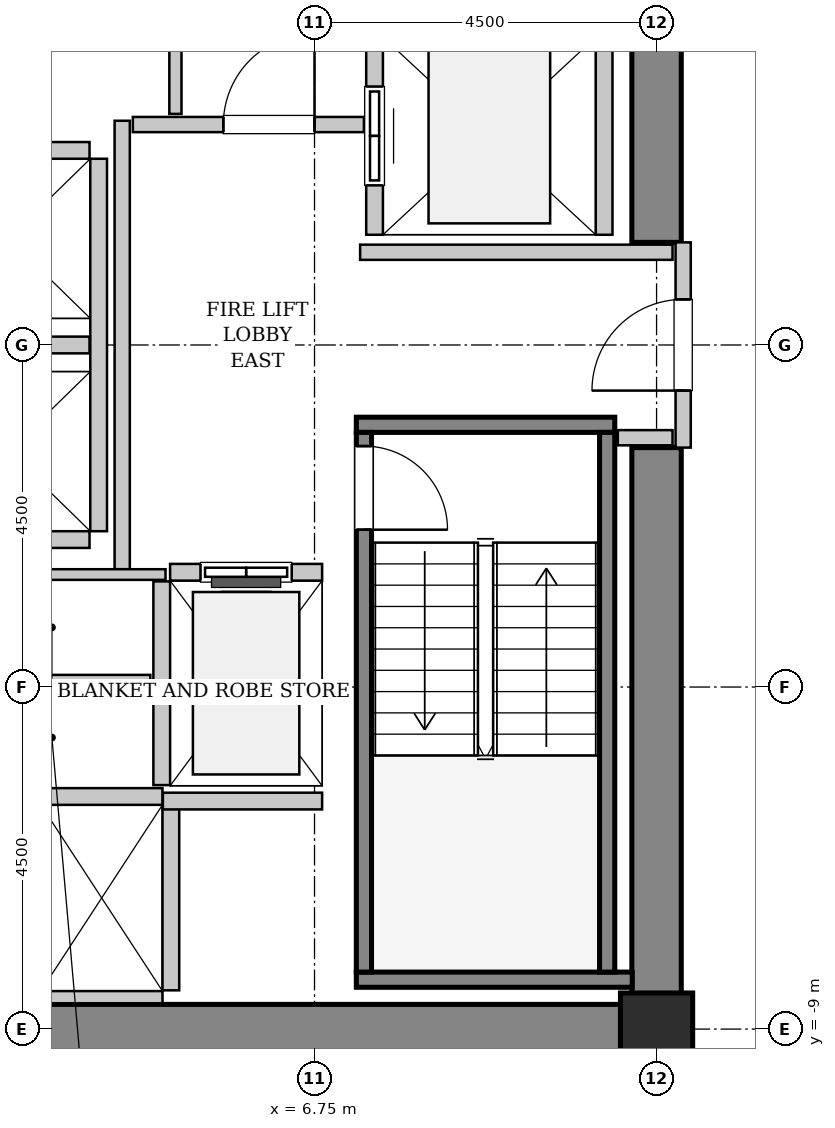
"""IFC4 building model, lengths in metres.
Left out: names, types, materials, properties, quantities, classifications, styles, units other than length and angle.
Written with IfcOpenShell. Run it as: python <this file> out.ifc"""

import sys

from ifc_helpers import new_model, si_unit, direction, frame, frame_2d, origin, origin_2d, place, context, subcontext, project, spatial, rectangle, hollow_rectangle, extrude, source, transform, mapped, element, fill, save


model = new_model("IFC4")
c1 = context("Model", 3, precision=1e-05, world=origin(), true_north=direction((0.0, 1.0)))
c2 = subcontext(c1, "Body", "Model", "MODEL_VIEW")
j1 = project(units=[si_unit("LENGTHUNIT", "METRE"), si_unit("PLANEANGLEUNIT", "RADIAN")], contexts=[c1])
p1 = place(None, origin())
s1 = spatial("IfcSite", under=j1, at=p1, CompositionType="ELEMENT")
p2 = place(p1, origin())
s2 = spatial("IfcBuilding", under=s1, at=p2, CompositionType="ELEMENT")
p3 = place(p2, frame((0.0, 0.0, 44.4)))
s3 = spatial("IfcBuildingStorey", under=s2, at=p3, CompositionType="ELEMENT", Elevation=44.4)
m1 = source(origin(), c2, "Body", "SweptSolid", [
    extrude(rectangle(XDim=10.025, YDim=0.65, at=frame_2d((5.012, 0.0))), origin(), (0.0, 0.0, 1.0), 3.8),
])
p4 = place(p3, frame((1.55, -9.0, 0.0), z_axis=(0.0, 0.0, 1.0), x_axis=(1.0, 0.0, 0.0)))
e1 = element("IfcWall", 1, at=p4, inside=s3, PredefinedType="SHEAR", context=c2, shape_type="MappedRepresentation", body=[
    mapped(m1, transform((0.0, 0.0, 0.0), x_axis=(1.0, 0.0, 0.0), y_axis=(0.0, 1.0, 0.0), z_axis=(0.0, 0.0, 1.0), scale=1.0)),
])
m2 = source(origin(), c2, "Body", "SweptSolid", [
    extrude(rectangle(XDim=7.325, YDim=0.65, at=frame_2d((3.663, 0.0))), origin(), (0.0, 0.0, 1.0), 3.8),
])
for number, where, z_axis, x_axis in (
    (2, (11.25, -8.675, 0.0), (0.0, 0.0, 1.0), (0.0, 1.0, 0.0)),
    (3, (11.25, 1.35, 0.0), (0.0, 0.0, 1.0), (0.0, 1.0, 0.0)),
):
    element("IfcWall", number, at=place(p3, frame(where, z_axis=z_axis, x_axis=x_axis)), inside=s3, PredefinedType="SHEAR", context=c2, shape_type="MappedRepresentation", body=[
        mapped(m2, transform((0.0, 0.0, 0.0), x_axis=(1.0, 0.0, 0.0), y_axis=(0.0, 1.0, 0.0), z_axis=(0.0, 0.0, 1.0), scale=1.0)),
    ])
m3 = source(origin(), c2, "Body", "SweptSolid", [
    extrude(hollow_rectangle(XDim=0.95, YDim=0.95, WallThickness=0.045, InnerFilletRadius=0.045, OuterFilletRadius=0.09, at=origin_2d()), origin(), (0.0, 0.0, 1.0), 3.8),
])
p5 = place(p3, frame((11.25, -9.0, 0.0), z_axis=(0.0, 0.0, 1.0), x_axis=(1.0, 0.0, 0.0)))
e4 = element("IfcColumn", 4, at=p5, inside=s3, PredefinedType="COLUMN", context=c2, shape_type="MappedRepresentation", body=[
    mapped(m3, transform((0.0, 0.0, 0.0), x_axis=(1.0, 0.0, 0.0), y_axis=(0.0, 1.0, 0.0), z_axis=(0.0, 0.0, 1.0), scale=1.0)),
])
m4 = source(origin(), c2, "Body", "SweptSolid", [
    extrude(rectangle(XDim=3.4, YDim=0.2, at=frame_2d((1.7, 0.0))), origin(), (0.0, 0.0, 1.0), 3.8),
])
p6 = place(p3, frame((7.3, -1.05, 0.0), z_axis=(0.0, 0.0, 1.0), x_axis=(1.0, 0.0, 0.0)))
e5 = element("IfcWall", 5, at=p6, inside=s3, PredefinedType="SOLIDWALL", context=c2, shape_type="MappedRepresentation", body=[
    mapped(m4, transform((0.0, 0.0, 0.0), x_axis=(1.0, 0.0, 0.0), y_axis=(0.0, 1.0, 0.0), z_axis=(0.0, 0.0, 1.0), scale=1.0)),
])
m5 = source(origin(), c2, "Body", "SweptSolid", [
    extrude(rectangle(XDim=3.63, YDim=0.2, at=frame_2d((1.815, 0.0))), origin(), (0.0, 0.0, 1.0), 3.8),
])
p7 = place(p3, frame((7.3, -8.35, 0.0), z_axis=(0.0, 0.0, 1.0), x_axis=(1.0, 0.0, 0.0)))
e6 = element("IfcWall", 6, at=p7, inside=s3, PredefinedType="SOLIDWALL", context=c2, shape_type="MappedRepresentation", body=[
    mapped(m5, transform((0.0, 0.0, 0.0), x_axis=(1.0, 0.0, 0.0), y_axis=(0.0, 1.0, 0.0), z_axis=(0.0, 0.0, 1.0), scale=1.0)),
])
m6 = source(origin(), c2, "Body", "SweptSolid", [
    extrude(rectangle(XDim=7.1, YDim=0.2, at=frame_2d((3.55, 0.0))), origin(), (0.0, 0.0, 1.0), 3.8),
])
p8 = place(p3, frame((7.4, -1.15, 0.0), z_axis=(0.0, 0.0, 1.0), x_axis=(0.0, -1.0, 0.0)))
e7 = element("IfcWall", 7, at=p8, inside=s3, PredefinedType="SOLIDWALL", context=c2, shape_type="MappedRepresentation", body=[
    mapped(m6, transform((0.0, 0.0, 0.0), x_axis=(1.0, 0.0, 0.0), y_axis=(0.0, 1.0, 0.0), z_axis=(0.0, 0.0, 1.0), scale=1.0)),
])
p9 = place(p8, frame((0.18, 0.0, 0.0)))
e8 = element("IfcOpeningElement", 8, at=p9, cuts=e7, PredefinedType="OPENING", context=c2, shape_type="SweptSolid", body=[
    extrude(rectangle(XDim=1.1, YDim=2.15, at=frame_2d((0.55, 1.075))), frame((0.0, 0.11, 0.0), z_axis=(0.0, -1.0, 0.0), x_axis=(1.0, 0.0, 0.0)), (0.0, 0.0, 1.0), 0.22),
])
p10 = place(p3, frame((10.6, -1.15, 0.0), z_axis=(0.0, 0.0, 1.0), x_axis=(0.0, -1.0, 0.0)))
e9 = element("IfcWall", 9, at=p10, inside=s3, PredefinedType="SOLIDWALL", context=c2, shape_type="MappedRepresentation", body=[
    mapped(m6, transform((0.0, 0.0, 0.0), x_axis=(1.0, 0.0, 0.0), y_axis=(0.0, 1.0, 0.0), z_axis=(0.0, 0.0, 1.0), scale=1.0)),
])
m7 = source(origin(), c2, "Body", "SweptSolid", [
    extrude(rectangle(XDim=2.0, YDim=0.22, at=frame_2d((1.0, 0.0))), origin(), (0.0, 0.0, 1.0), 3.535),
])
p11 = place(p3, frame((6.85, -2.99, 0.0), z_axis=(0.0, 0.0, 1.0), x_axis=(-1.0, 0.0, 0.0)))
e10 = element("IfcWall", 10, at=p11, inside=s3, PredefinedType="SOLIDWALL", context=c2, shape_type="MappedRepresentation", body=[
    mapped(m7, transform((0.0, 0.0, 0.0), x_axis=(1.0, 0.0, 0.0), y_axis=(0.0, 1.0, 0.0), z_axis=(0.0, 0.0, 1.0), scale=1.0)),
])
p12 = place(p11, frame((0.4, 0.0, 0.0)))
e11 = element("IfcOpeningElement", 11, at=p12, cuts=e10, PredefinedType="OPENING", context=c2, shape_type="SweptSolid", body=[
    extrude(rectangle(XDim=1.2, YDim=2.2, at=frame_2d((0.6, 1.1))), frame((0.0, 0.12, 0.0), z_axis=(0.0, -1.0, 0.0), x_axis=(1.0, 0.0, 0.0)), (0.0, 0.0, 1.0), 0.24),
])
m8 = source(origin(), c2, "Body", "SweptSolid", [
    extrude(rectangle(XDim=2.68, YDim=0.22, at=frame_2d((1.34, 0.0))), origin(), (0.0, 0.0, 1.0), 3.535),
])
p13 = place(p3, frame((4.74, -3.11, 0.0), z_axis=(0.0, 0.0, 1.0), x_axis=(0.0, -1.0, 0.0)))
e12 = element("IfcWall", 12, at=p13, inside=s3, PredefinedType="SOLIDWALL", context=c2, shape_type="MappedRepresentation", body=[
    mapped(m8, transform((0.0, 0.0, 0.0), x_axis=(1.0, 0.0, 0.0), y_axis=(0.0, 1.0, 0.0), z_axis=(0.0, 0.0, 1.0), scale=1.0)),
])
m9 = source(origin(), c2, "Body", "SweptSolid", [
    extrude(rectangle(XDim=5.45, YDim=0.22, at=frame_2d((2.725, 0.0))), origin(), (0.0, 0.0, 1.0), 3.535),
])
p14 = place(p3, frame((7.54, 6.9, 0.0), z_axis=(0.0, 0.0, 1.0), x_axis=(0.0, -1.0, 0.0)))
e13 = element("IfcWall", 13, at=p14, inside=s3, PredefinedType="SOLIDWALL", context=c2, shape_type="MappedRepresentation", body=[
    mapped(m9, transform((0.0, 0.0, 0.0), x_axis=(1.0, 0.0, 0.0), y_axis=(0.0, 1.0, 0.0), z_axis=(0.0, 0.0, 1.0), scale=1.0)),
])
p15 = place(p14, frame((3.5, 0.0, 0.0)))
e14 = element("IfcOpeningElement", 14, at=p15, cuts=e13, PredefinedType="OPENING", context=c2, shape_type="SweptSolid", body=[
    extrude(rectangle(XDim=1.3, YDim=2.3, at=frame_2d((0.65, 1.15))), frame((0.0, 0.12, 0.0), z_axis=(0.0, -1.0, 0.0), x_axis=(1.0, 0.0, 0.0)), (0.0, 0.0, 1.0), 0.24),
])
p16 = place(p14, frame((0.65, 0.0, 0.0)))
e15 = element("IfcOpeningElement", 15, at=p16, cuts=e13, PredefinedType="OPENING", context=c2, shape_type="SweptSolid", body=[
    extrude(rectangle(XDim=1.3, YDim=2.3, at=frame_2d((0.65, 1.15))), frame((0.0, 0.12, 0.0), z_axis=(0.0, -1.0, 0.0), x_axis=(1.0, 0.0, 0.0)), (0.0, 0.0, 1.0), 0.24),
])
p17 = place(p3, frame((10.56, 1.45, 0.0), z_axis=(0.0, 0.0, 1.0), x_axis=(0.0, 1.0, 0.0)))
e16 = element("IfcWall", 16, at=p17, inside=s3, PredefinedType="SOLIDWALL", context=c2, shape_type="MappedRepresentation", body=[
    mapped(m9, transform((0.0, 0.0, 0.0), x_axis=(1.0, 0.0, 0.0), y_axis=(0.0, 1.0, 0.0), z_axis=(0.0, 0.0, 1.0), scale=1.0)),
])
m10 = source(origin(), c2, "Body", "SweptSolid", [
    extrude(rectangle(XDim=3.2, YDim=0.22, at=frame_2d((1.6, 0.0))), origin(), (0.0, 0.0, 1.0), 3.535),
])
p18 = place(p3, frame((4.75, -5.94, 0.0), z_axis=(0.0, 0.0, 1.0), x_axis=(-1.0, 0.0, 0.0)))
e17 = element("IfcWall", 17, at=p18, inside=s3, PredefinedType="SOLIDWALL", context=c2, shape_type="MappedRepresentation", body=[
    mapped(m10, transform((0.0, 0.0, 0.0), x_axis=(1.0, 0.0, 0.0), y_axis=(0.0, 1.0, 0.0), z_axis=(0.0, 0.0, 1.0), scale=1.0)),
])
m11 = source(origin(), c2, "Body", "SweptSolid", [
    extrude(rectangle(XDim=3.2, YDim=0.16, at=frame_2d((1.6, 0.0))), origin(), (0.0, 0.0, 1.0), 2.425),
])
p19 = place(p3, frame((1.55, -8.58, 0.0), z_axis=(0.0, 0.0, 1.0), x_axis=(1.0, 0.0, 0.0)))
e18 = element("IfcWall", 18, at=p19, inside=s3, PredefinedType="PARTITIONING", context=c2, shape_type="MappedRepresentation", body=[
    mapped(m11, transform((0.0, 0.0, 0.0), x_axis=(1.0, 0.0, 0.0), y_axis=(0.0, 1.0, 0.0), z_axis=(0.0, 0.0, 1.0), scale=1.0)),
])
m12 = source(origin(), c2, "Body", "SweptSolid", [
    extrude(rectangle(XDim=2.43, YDim=0.22, at=frame_2d((1.215, 0.0))), origin(), (0.0, 0.0, 1.0), 3.535),
])
p20 = place(p3, frame((4.86, -8.49, 0.0), z_axis=(0.0, 0.0, 1.0), x_axis=(0.0, 1.0, 0.0)))
e19 = element("IfcWall", 19, at=p20, inside=s3, PredefinedType="SOLIDWALL", context=c2, shape_type="MappedRepresentation", body=[
    mapped(m12, transform((0.0, 0.0, 0.0), x_axis=(1.0, 0.0, 0.0), y_axis=(0.0, 1.0, 0.0), z_axis=(0.0, 0.0, 1.0), scale=1.0)),
])
m13 = source(origin(), c2, "Body", "SweptSolid", [
    extrude(rectangle(XDim=4.9, YDim=0.22, at=frame_2d((2.45, 0.0))), origin(), (0.0, 0.0, 1.0), 3.535),
])
p21 = place(p3, frame((3.91, -2.45, 0.0), z_axis=(0.0, 0.0, 1.0), x_axis=(0.0, 1.0, 0.0)))
e20 = element("IfcWall", 20, at=p21, inside=s3, PredefinedType="SOLIDWALL", context=c2, shape_type="MappedRepresentation", body=[
    mapped(m13, transform((0.0, 0.0, 0.0), x_axis=(1.0, 0.0, 0.0), y_axis=(0.0, 1.0, 0.0), z_axis=(0.0, 0.0, 1.0), scale=1.0)),
])
m14 = source(origin(), c2, "Body", "SweptSolid", [
    extrude(rectangle(XDim=2.13, YDim=0.22, at=frame_2d((1.065, 0.0))), origin(), (0.0, 0.0, 1.0), 3.535),
])
for number, where, z_axis, x_axis in (
    (21, (1.66, -2.56, 0.0), (0.0, 0.0, 1.0), (1.0, 0.0, 0.0)),
    (22, (1.66, 0.0, 0.0), (0.0, 0.0, 1.0), (1.0, 0.0, 0.0)),
    (23, (3.79, 2.56, 0.0), (0.0, 0.0, 1.0), (-1.0, 0.0, 0.0)),
):
    element("IfcWall", number, at=place(p3, frame(where, z_axis=z_axis, x_axis=x_axis)), inside=s3, PredefinedType="SOLIDWALL", context=c2, shape_type="MappedRepresentation", body=[
        mapped(m14, transform((0.0, 0.0, 0.0), x_axis=(1.0, 0.0, 0.0), y_axis=(0.0, 1.0, 0.0), z_axis=(0.0, 0.0, 1.0), scale=1.0)),
    ])
m15 = source(origin(), c2, "Body", "SweptSolid", [
    extrude(rectangle(XDim=2.095, YDim=0.22, at=frame_2d((1.048, 0.0))), origin(), (0.0, 0.0, 1.0), 3.535),
])
p22 = place(p3, frame((4.755, -6.0, 0.0), z_axis=(0.0, 0.0, 1.0), x_axis=(1.0, 0.0, 0.0)))
e24 = element("IfcWall", 24, at=p22, inside=s3, PredefinedType="SOLIDWALL", context=c2, shape_type="MappedRepresentation", body=[
    mapped(m15, transform((0.0, 0.0, 0.0), x_axis=(1.0, 0.0, 0.0), y_axis=(0.0, 1.0, 0.0), z_axis=(0.0, 0.0, 1.0), scale=1.0)),
])
m16 = source(origin(), c2, "Body", "SweptSolid", [
    extrude(rectangle(XDim=2.7, YDim=0.2, at=frame_2d((1.35, 0.0))), origin(), (0.0, 0.0, 1.0), 2.425),
])
p23 = place(p3, frame((11.6, -1.35, 0.0), z_axis=(0.0, 0.0, 1.0), x_axis=(0.0, 1.0, 0.0)))
e25 = element("IfcWall", 25, at=p23, inside=s3, PredefinedType="PARTITIONING", context=c2, shape_type="MappedRepresentation", body=[
    mapped(m16, transform((0.0, 0.0, 0.0), x_axis=(1.0, 0.0, 0.0), y_axis=(0.0, 1.0, 0.0), z_axis=(0.0, 0.0, 1.0), scale=1.0)),
])
p24 = place(p23, frame((0.75, 0.0, 0.0)))
e26 = element("IfcOpeningElement", 26, at=p24, cuts=e25, PredefinedType="OPENING", context=c2, shape_type="SweptSolid", body=[
    extrude(rectangle(XDim=1.2, YDim=2.15, at=frame_2d((0.6, 1.075))), frame((0.0, 0.11, 0.0), z_axis=(0.0, -1.0, 0.0), x_axis=(1.0, 0.0, 0.0)), (0.0, 0.0, 1.0), 0.22),
])
m17 = source(origin(), c2, "Body", "SweptSolid", [
    extrude(rectangle(XDim=5.9, YDim=0.2, at=frame_2d((2.95, 0.0))), origin(), (0.0, 0.0, 1.0), 3.535),
])
p25 = place(p3, frame((4.22, -2.95, 0.0), z_axis=(0.0, 0.0, 1.0), x_axis=(0.0, 1.0, 0.0)))
e27 = element("IfcWall", 27, at=p25, inside=s3, PredefinedType="PARTITIONING", context=c2, shape_type="MappedRepresentation", body=[
    mapped(m17, transform((0.0, 0.0, 0.0), x_axis=(1.0, 0.0, 0.0), y_axis=(0.0, 1.0, 0.0), z_axis=(0.0, 0.0, 1.0), scale=1.0)),
])
m18 = source(origin(), c2, "Body", "SweptSolid", [
    extrude(rectangle(XDim=3.04, YDim=0.2, at=frame_2d((1.52, 0.0))), origin(), (0.0, 0.0, 1.0), 3.535),
])
p26 = place(p3, frame((4.36, 2.9, 0.0), z_axis=(0.0, 0.0, 1.0), x_axis=(1.0, 0.0, 0.0)))
e28 = element("IfcWall", 28, at=p26, inside=s3, PredefinedType="PARTITIONING", context=c2, shape_type="MappedRepresentation", body=[
    mapped(m18, transform((0.0, 0.0, 0.0), x_axis=(1.0, 0.0, 0.0), y_axis=(0.0, 1.0, 0.0), z_axis=(0.0, 0.0, 1.0), scale=1.0)),
])
p27 = place(p26, frame((1.19, 0.0, 0.0)))
e29 = element("IfcOpeningElement", 29, at=p27, cuts=e28, PredefinedType="OPENING", context=c2, shape_type="SweptSolid", body=[
    extrude(rectangle(XDim=1.2, YDim=2.15, at=frame_2d((0.6, 1.075))), frame((0.0, 0.11, 0.0), z_axis=(0.0, -1.0, 0.0), x_axis=(1.0, 0.0, 0.0)), (0.0, 0.0, 1.0), 0.22),
])
m19 = source(origin(), c2, "Body", "SweptSolid", [
    extrude(rectangle(XDim=4.11, YDim=0.2, at=frame_2d((2.055, 0.0))), origin(), (0.0, 0.0, 1.0), 3.535),
])
p28 = place(p3, frame((7.35, 1.22, 0.0), z_axis=(0.0, 0.0, 1.0), x_axis=(1.0, 0.0, 0.0)))
e30 = element("IfcWall", 30, at=p28, inside=s3, PredefinedType="PARTITIONING", context=c2, shape_type="MappedRepresentation", body=[
    mapped(m19, transform((0.0, 0.0, 0.0), x_axis=(1.0, 0.0, 0.0), y_axis=(0.0, 1.0, 0.0), z_axis=(0.0, 0.0, 1.0), scale=1.0)),
])
m20 = source(origin(), c2, "Body", "SweptSolid", [
    extrude(rectangle(XDim=0.72, YDim=0.2, at=frame_2d((0.36, 0.0))), origin(), (0.0, 0.0, 1.0), 3.535),
])
p29 = place(p3, frame((10.74, -1.22, 0.0), z_axis=(0.0, 0.0, 1.0), x_axis=(1.0, 0.0, 0.0)))
e31 = element("IfcWall", 31, at=p29, inside=s3, PredefinedType="PARTITIONING", context=c2, shape_type="MappedRepresentation", body=[
    mapped(m20, transform((0.0, 0.0, 0.0), x_axis=(1.0, 0.0, 0.0), y_axis=(0.0, 1.0, 0.0), z_axis=(0.0, 0.0, 1.0), scale=1.0)),
])
m21 = source(origin(), c2, "Body", "SweptSolid", [
    extrude(rectangle(XDim=3.015, YDim=0.16, at=frame_2d((1.507, 0.0))), origin(), (0.0, 0.0, 1.0), 3.535),
])
p30 = place(p3, frame((4.92, 3.04, 0.0), z_axis=(0.0, 0.0, 1.0), x_axis=(0.0, 1.0, 0.0)))
e32 = element("IfcWall", 32, at=p30, inside=s3, PredefinedType="PARTITIONING", context=c2, shape_type="MappedRepresentation", body=[
    mapped(m21, transform((0.0, 0.0, 0.0), x_axis=(1.0, 0.0, 0.0), y_axis=(0.0, 1.0, 0.0), z_axis=(0.0, 0.0, 1.0), scale=1.0)),
])
m22 = source(origin(), c2, "Body", "SweptSolid", [
    extrude(rectangle(XDim=3.15, YDim=0.14, at=frame_2d((1.575, 0.0))), origin(), (0.0, 0.0, 1.0), 3.535),
])
p31 = place(p3, frame((1.64, -3.02, 0.0), z_axis=(0.0, 0.0, 1.0), x_axis=(1.0, 0.0, 0.0)))
e33 = element("IfcWall", 33, at=p31, inside=s3, PredefinedType="PARTITIONING", context=c2, shape_type="MappedRepresentation", body=[
    mapped(m22, transform((0.0, 0.0, 0.0), x_axis=(1.0, 0.0, 0.0), y_axis=(0.0, 1.0, 0.0), z_axis=(0.0, 0.0, 1.0), scale=1.0)),
])
m23 = source(origin(), c2, "Body", "SweptSolid", [
    extrude(rectangle(XDim=2.95, YDim=0.14, at=frame_2d((1.475, 0.0))), origin(), (0.0, 0.0, 1.0), 3.535),
])
p32 = place(p3, frame((1.64, -4.41, 0.0), z_axis=(0.0, 0.0, 1.0), x_axis=(1.0, 0.0, 0.0)))
e34 = element("IfcWall", 34, at=p32, inside=s3, PredefinedType="PARTITIONING", context=c2, shape_type="MappedRepresentation", body=[
    mapped(m23, transform((0.0, 0.0, 0.0), x_axis=(1.0, 0.0, 0.0), y_axis=(0.0, 1.0, 0.0), z_axis=(0.0, 0.0, 1.0), scale=1.0)),
])
m24 = source(origin(), c2, "Body", "SweptSolid", [
    extrude(rectangle(XDim=1.1, YDim=2.15, at=frame_2d((0.55, 1.075))), frame((0.0, 0.025, 0.0), z_axis=(0.0, -1.0, 0.0), x_axis=(1.0, 0.0, 0.0)), (0.0, 0.0, 1.0), 0.05),
])
p33 = place(p9, origin())
e35 = element("IfcDoor", 35, at=p33, inside=s3, OperationType="SINGLE_SWING_RIGHT", PredefinedType="DOOR", context=c2, shape_type="MappedRepresentation", body=[
    mapped(m24, transform((0.0, 0.0, 0.0), x_axis=(1.0, 0.0, 0.0), y_axis=(0.0, 1.0, 0.0), z_axis=(0.0, 0.0, 1.0), scale=1.0)),
])
fill(e8, e35)
m25 = source(origin(), c2, "Body", "SweptSolid", [
    extrude(rectangle(XDim=1.2, YDim=2.2, at=frame_2d((0.6, 1.1))), frame((0.0, 0.025, 0.0), z_axis=(0.0, -1.0, 0.0), x_axis=(1.0, 0.0, 0.0)), (0.0, 0.0, 1.0), 0.05),
])
p34 = place(p12, origin())
e36 = element("IfcDoor", 36, at=p34, inside=s3, OperationType="SLIDING_TO_LEFT", PredefinedType="DOOR", context=c2, shape_type="MappedRepresentation", body=[
    mapped(m25, transform((0.0, 0.0, 0.0), x_axis=(1.0, 0.0, 0.0), y_axis=(0.0, 1.0, 0.0), z_axis=(0.0, 0.0, 1.0), scale=1.0)),
])
fill(e11, e36)
m26 = source(origin(), c2, "Body", "SweptSolid", [
    extrude(rectangle(XDim=1.3, YDim=2.3, at=frame_2d((0.65, 1.15))), frame((0.0, 0.025, 0.0), z_axis=(0.0, -1.0, 0.0), x_axis=(1.0, 0.0, 0.0)), (0.0, 0.0, 1.0), 0.05),
])
p35 = place(p15, origin())
e37 = element("IfcDoor", 37, at=p35, inside=s3, OperationType="SLIDING_TO_RIGHT", PredefinedType="DOOR", context=c2, shape_type="MappedRepresentation", body=[
    mapped(m26, transform((0.0, 0.0, 0.0), x_axis=(1.0, 0.0, 0.0), y_axis=(0.0, 1.0, 0.0), z_axis=(0.0, 0.0, 1.0), scale=1.0)),
])
fill(e14, e37)
m27 = source(origin(), c2, "Body", "SweptSolid", [
    extrude(rectangle(XDim=1.2, YDim=2.15, at=frame_2d((0.6, 1.075))), frame((0.0, 0.025, 0.0), z_axis=(0.0, -1.0, 0.0), x_axis=(1.0, 0.0, 0.0)), (0.0, 0.0, 1.0), 0.05),
])
p36 = place(p24, origin())
e38 = element("IfcDoor", 38, at=p36, inside=s3, OperationType="SINGLE_SWING_LEFT", PredefinedType="DOOR", context=c2, shape_type="MappedRepresentation", body=[
    mapped(m27, transform((0.0, 0.0, 0.0), x_axis=(1.0, 0.0, 0.0), y_axis=(0.0, 1.0, 0.0), z_axis=(0.0, 0.0, 1.0), scale=1.0)),
])
fill(e26, e38)
p37 = place(p27, origin())
e39 = element("IfcDoor", 39, at=p37, inside=s3, OperationType="SINGLE_SWING_RIGHT", PredefinedType="DOOR", context=c2, shape_type="MappedRepresentation", body=[
    mapped(m27, transform((0.0, 0.0, 0.0), x_axis=(1.0, 0.0, 0.0), y_axis=(0.0, 1.0, 0.0), z_axis=(0.0, 0.0, 1.0), scale=1.0)),
])
fill(e29, e39)
save(model, sys.argv[1])
